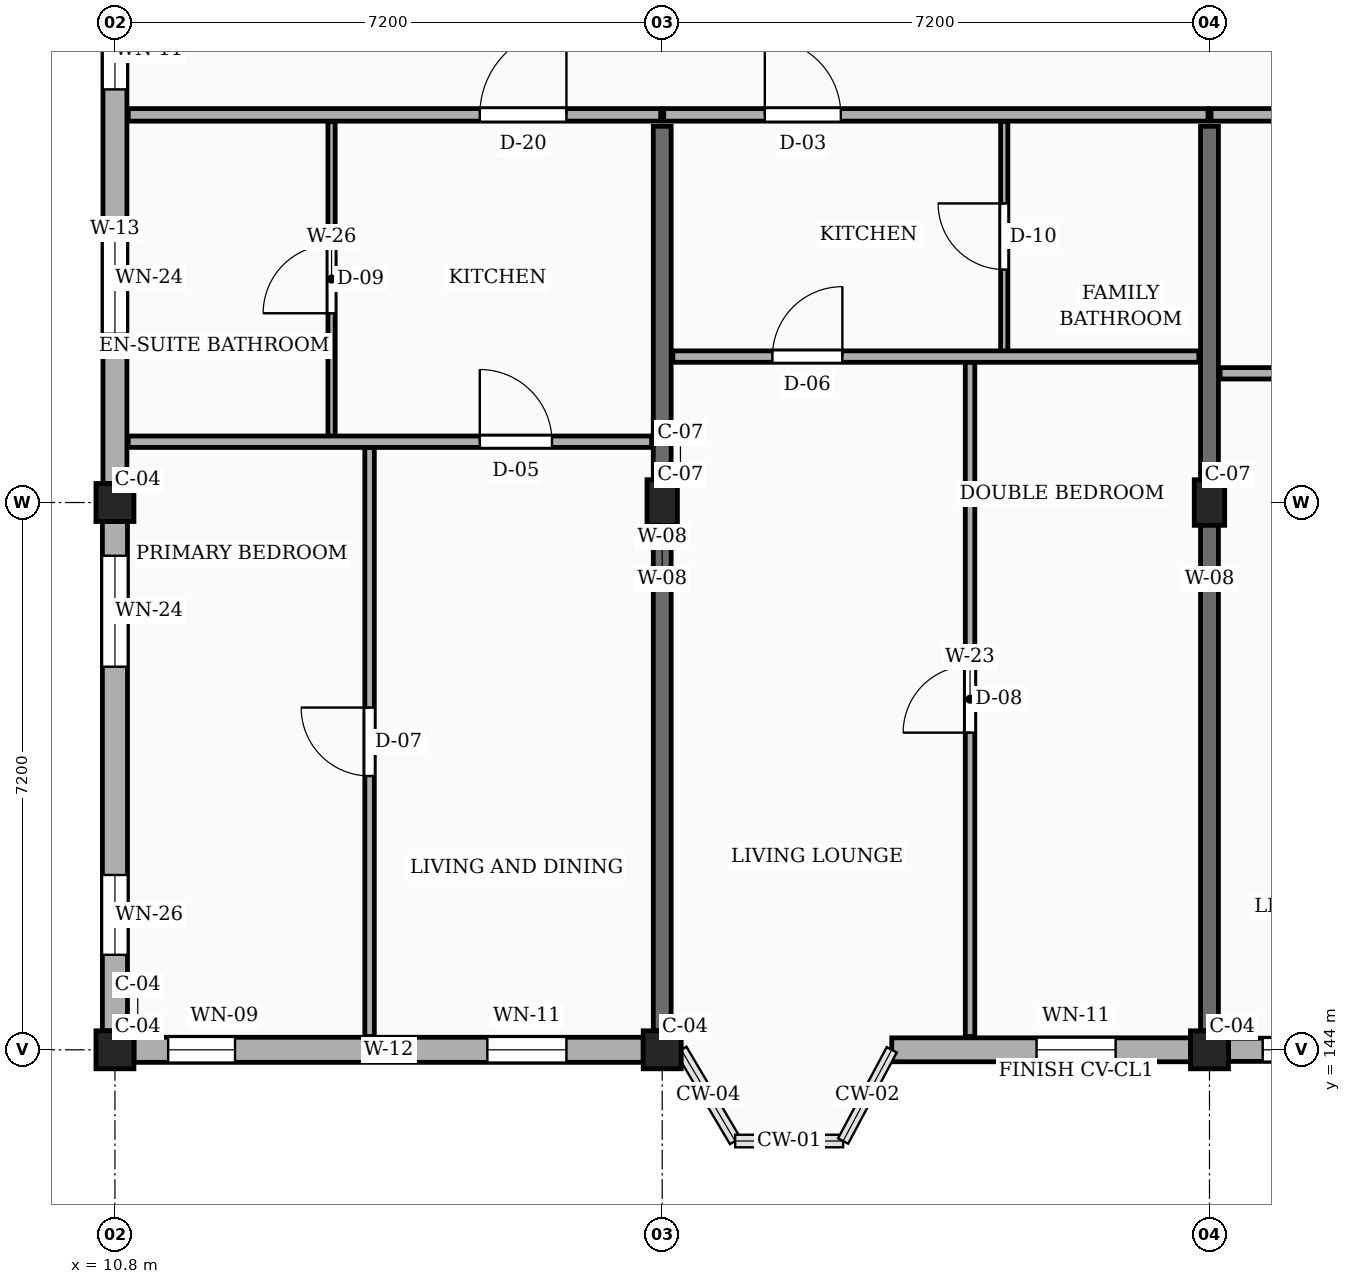
"""IFC4 building model, lengths in metres.
Left out: names, types, materials, properties, quantities, classifications, styles, units other than length and angle.
Written with IfcOpenShell. Run it as: python <this file> out.ifc"""

import sys

from ifc_helpers import new_model, si_unit, direction, frame, frame_2d, origin, origin_2d, place, context, subcontext, project, spatial, rectangle, extrude, element, fill, save


model = new_model("IFC4")
c1 = context("Model", 3, precision=1e-05, world=origin(), true_north=direction((0.0, 1.0)))
c2 = subcontext(c1, "Body", "Model", "MODEL_VIEW")
j1 = project(units=[si_unit("LENGTHUNIT", "METRE"), si_unit("PLANEANGLEUNIT", "RADIAN")], contexts=[c1])
p1 = place(None, origin())
s1 = spatial("IfcSite", under=j1, at=p1, CompositionType="ELEMENT")
p2 = place(p1, origin())
s2 = spatial("IfcBuilding", under=s1, at=p2, CompositionType="ELEMENT")
p3 = place(p2, frame((0.0, 0.0, 23.4)))
s3 = spatial("IfcBuildingStorey", under=s2, at=p3, CompositionType="ELEMENT", Elevation=23.4)
for number, where, z_axis, x_axis in (
    (1, (10.8, 144.0, 0.0), (0.0, 0.0, 1.0), (1.0, 0.0, 0.0)),
    (2, (10.8, 151.2, 0.0), (0.0, 0.0, 1.0), (1.0, 0.0, 0.0)),
    (3, (18.0, 144.0, 0.0), (0.0, 0.0, 1.0), (1.0, 0.0, 0.0)),
):
    element("IfcColumn", number, at=place(p3, frame(where, z_axis=z_axis, x_axis=x_axis)), inside=s3, PredefinedType="COLUMN", context=c2, shape_type="SweptSolid", body=[
        extrude(rectangle(XDim=0.5, YDim=0.5, at=origin_2d()), origin(), (0.0, 0.0, 1.0), 3.15),
    ])
p4 = place(p3, frame((18.0, 151.2, 0.0), z_axis=(0.0, 0.0, 1.0), x_axis=(1.0, 0.0, 0.0)))
e4 = element("IfcColumn", 4, at=p4, inside=s3, PredefinedType="COLUMN", context=c2, shape_type="SweptSolid", body=[
    extrude(rectangle(XDim=0.4, YDim=0.6, at=origin_2d()), origin(), (0.0, 0.0, 1.0), 3.15),
])
p5 = place(p3, frame((25.2, 144.0, 0.0), z_axis=(0.0, 0.0, 1.0), x_axis=(1.0, 0.0, 0.0)))
e5 = element("IfcColumn", 5, at=p5, inside=s3, PredefinedType="COLUMN", context=c2, shape_type="SweptSolid", body=[
    extrude(rectangle(XDim=0.5, YDim=0.5, at=origin_2d()), origin(), (0.0, 0.0, 1.0), 3.15),
])
p6 = place(p3, frame((25.2, 151.2, 0.0), z_axis=(0.0, 0.0, 1.0), x_axis=(1.0, 0.0, 0.0)))
e6 = element("IfcColumn", 6, at=p6, inside=s3, PredefinedType="COLUMN", context=c2, shape_type="SweptSolid", body=[
    extrude(rectangle(XDim=0.4, YDim=0.6, at=origin_2d()), origin(), (0.0, 0.0, 1.0), 3.15),
])
for number, where, z_axis, x_axis in (
    (7, (18.0, 144.25, 0.0), (0.0, 0.0, 1.0), (0.0, 1.0, 0.0)),
    (8, (25.2, 144.25, 0.0), (0.0, 0.0, 1.0), (0.0, 1.0, 0.0)),
):
    element("IfcWall", number, at=place(p3, frame(where, z_axis=z_axis, x_axis=x_axis)), inside=s3, PredefinedType="SOLIDWALL", context=c2, shape_type="SweptSolid", body=[
        extrude(rectangle(XDim=11.9, YDim=0.235, at=frame_2d((5.95, 0.0))), origin(), (0.0, 0.0, 1.0), 2.185),
    ])
p7 = place(p3, frame((11.05, 144.0, 0.0), z_axis=(0.0, 0.0, 1.0), x_axis=(1.0, 0.0, 0.0)))
e9 = element("IfcWall", 9, at=p7, inside=s3, PredefinedType="SOLIDWALL", context=c2, shape_type="SweptSolid", body=[
    extrude(rectangle(XDim=6.7, YDim=0.33, at=frame_2d((3.35, 0.0))), origin(), (0.0, 0.0, 1.0), 2.455),
])
p8 = place(p7, frame((0.45, 0.0, 0.78)))
e10 = element("IfcOpeningElement", 10, at=p8, cuts=e9, PredefinedType="OPENING", context=c2, shape_type="SweptSolid", body=[
    extrude(rectangle(XDim=0.88, YDim=1.26, at=frame_2d((0.44, 0.63))), frame((0.0, 0.175, 0.0), z_axis=(0.0, -1.0, 0.0), x_axis=(1.0, 0.0, 0.0)), (0.0, 0.0, 1.0), 0.35),
])
p9 = place(p7, frame((4.65, 0.0, 0.78)))
e11 = element("IfcOpeningElement", 11, at=p9, cuts=e9, PredefinedType="OPENING", context=c2, shape_type="SweptSolid", body=[
    extrude(rectangle(XDim=1.04, YDim=1.26, at=frame_2d((0.52, 0.63))), frame((0.0, 0.175, 0.0), z_axis=(0.0, -1.0, 0.0), x_axis=(1.0, 0.0, 0.0)), (0.0, 0.0, 1.0), 0.35),
])
p10 = place(p3, frame((21.02, 144.0, 0.0), z_axis=(0.0, 0.0, 1.0), x_axis=(1.0, 0.0, 0.0)))
e12 = element("IfcWall", 12, at=p10, inside=s3, PredefinedType="SOLIDWALL", context=c2, shape_type="SweptSolid", body=[
    extrude(rectangle(XDim=3.93, YDim=0.315, at=frame_2d((1.965, 0.0))), origin(), (0.0, 0.0, 1.0), 2.455),
])
p11 = place(p10, frame((1.905, 0.0, 0.78)))
e13 = element("IfcOpeningElement", 13, at=p11, cuts=e12, PredefinedType="OPENING", context=c2, shape_type="SweptSolid", body=[
    extrude(rectangle(XDim=1.04, YDim=1.26, at=frame_2d((0.52, 0.63))), frame((0.0, 0.167, 0.0), z_axis=(0.0, -1.0, 0.0), x_axis=(1.0, 0.0, 0.0)), (0.0, 0.0, 1.0), 0.335),
])
p12 = place(p3, frame((25.45, 144.0, 0.0), z_axis=(0.0, 0.0, 1.0), x_axis=(1.0, 0.0, 0.0)))
e14 = element("IfcWall", 14, at=p12, inside=s3, PredefinedType="SOLIDWALL", context=c2, shape_type="SweptSolid", body=[
    extrude(rectangle(XDim=6.7, YDim=0.305, at=frame_2d((3.35, 0.0))), origin(), (0.0, 0.0, 1.0), 2.455),
])
p13 = place(p12, frame((0.45, 0.0, 0.78)))
e15 = element("IfcOpeningElement", 15, at=p13, cuts=e14, PredefinedType="OPENING", context=c2, shape_type="SweptSolid", body=[
    extrude(rectangle(XDim=1.12, YDim=1.26, at=frame_2d((0.56, 0.63))), frame((0.0, 0.163, 0.0), z_axis=(0.0, -1.0, 0.0), x_axis=(1.0, 0.0, 0.0)), (0.0, 0.0, 1.0), 0.325),
])
p14 = place(p12, frame((4.65, 0.0, 0.78)))
e16 = element("IfcOpeningElement", 16, at=p14, cuts=e14, PredefinedType="OPENING", context=c2, shape_type="SweptSolid", body=[
    extrude(rectangle(XDim=1.28, YDim=1.26, at=frame_2d((0.64, 0.63))), frame((0.0, 0.163, 0.0), z_axis=(0.0, -1.0, 0.0), x_axis=(1.0, 0.0, 0.0)), (0.0, 0.0, 1.0), 0.325),
])
p15 = place(p3, frame((10.8, 158.15, 0.0), z_axis=(0.0, 0.0, 1.0), x_axis=(0.0, -1.0, 0.0)))
e17 = element("IfcWall", 17, at=p15, inside=s3, PredefinedType="SOLIDWALL", context=c2, shape_type="SweptSolid", body=[
    extrude(rectangle(XDim=6.7, YDim=0.315, at=frame_2d((3.35, 0.0))), origin(), (0.0, 0.0, 1.0), 2.455),
])
p16 = place(p15, frame((0.475, 0.0, 0.78)))
e18 = element("IfcOpeningElement", 18, at=p16, cuts=e17, PredefinedType="OPENING", context=c2, shape_type="SweptSolid", body=[
    extrude(rectangle(XDim=1.04, YDim=1.26, at=frame_2d((0.52, 0.63))), frame((0.0, 0.167, 0.0), z_axis=(0.0, -1.0, 0.0), x_axis=(1.0, 0.0, 0.0)), (0.0, 0.0, 1.0), 0.335),
])
p17 = place(p15, frame((3.27, 0.0, 0.78)))
e19 = element("IfcOpeningElement", 19, at=p17, cuts=e17, PredefinedType="OPENING", context=c2, shape_type="SweptSolid", body=[
    extrude(rectangle(XDim=1.46, YDim=1.36, at=frame_2d((0.73, 0.68))), frame((0.0, 0.167, 0.0), z_axis=(0.0, -1.0, 0.0), x_axis=(1.0, 0.0, 0.0)), (0.0, 0.0, 1.0), 0.335),
])
p18 = place(p3, frame((10.8, 150.95, 0.0), z_axis=(0.0, 0.0, 1.0), x_axis=(0.0, -1.0, 0.0)))
e20 = element("IfcWall", 20, at=p18, inside=s3, PredefinedType="SOLIDWALL", context=c2, shape_type="SweptSolid", body=[
    extrude(rectangle(XDim=6.7, YDim=0.33, at=frame_2d((3.35, 0.0))), origin(), (0.0, 0.0, 1.0), 2.455),
])
p19 = place(p18, frame((0.45, 0.0, 0.78)))
e21 = element("IfcOpeningElement", 21, at=p19, cuts=e20, PredefinedType="OPENING", context=c2, shape_type="SweptSolid", body=[
    extrude(rectangle(XDim=1.46, YDim=1.36, at=frame_2d((0.73, 0.68))), frame((0.0, 0.175, 0.0), z_axis=(0.0, -1.0, 0.0), x_axis=(1.0, 0.0, 0.0)), (0.0, 0.0, 1.0), 0.35),
])
p20 = place(p18, frame((4.65, 0.0, 0.78)))
e22 = element("IfcOpeningElement", 22, at=p20, cuts=e20, PredefinedType="OPENING", context=c2, shape_type="SweptSolid", body=[
    extrude(rectangle(XDim=1.05, YDim=1.44, at=frame_2d((0.525, 0.72))), frame((0.0, 0.175, 0.0), z_axis=(0.0, -1.0, 0.0), x_axis=(1.0, 0.0, 0.0)), (0.0, 0.0, 1.0), 0.35),
])
p21 = place(p3, frame((10.975, 156.3, 0.0), z_axis=(0.0, 0.0, 1.0), x_axis=(1.0, 0.0, 0.0)))
e23 = element("IfcWall", 23, at=p21, inside=s3, PredefinedType="PARTITIONING", context=c2, shape_type="SweptSolid", body=[
    extrude(rectangle(XDim=7.005, YDim=0.165, at=frame_2d((3.502, 0.0))), origin(), (0.0, 0.0, 1.0), 2.32),
])
p22 = place(p21, frame((4.625, 0.0, 0.0)))
e24 = element("IfcOpeningElement", 24, at=p22, cuts=e23, PredefinedType="OPENING", context=c2, shape_type="SweptSolid", body=[
    extrude(rectangle(XDim=1.14, YDim=2.18, at=frame_2d((0.57, 1.09))), frame((0.0, 0.093, 0.0), z_axis=(0.0, -1.0, 0.0), x_axis=(1.0, 0.0, 0.0)), (0.0, 0.0, 1.0), 0.185),
])
p23 = place(p3, frame((18.02, 156.3, 0.0), z_axis=(0.0, 0.0, 1.0), x_axis=(1.0, 0.0, 0.0)))
e25 = element("IfcWall", 25, at=p23, inside=s3, PredefinedType="PARTITIONING", context=c2, shape_type="SweptSolid", body=[
    extrude(rectangle(XDim=7.16, YDim=0.165, at=frame_2d((3.58, 0.0))), origin(), (0.0, 0.0, 1.0), 2.32),
])
p24 = place(p23, frame((1.33, 0.0, 0.0)))
e26 = element("IfcOpeningElement", 26, at=p24, cuts=e25, PredefinedType="OPENING", context=c2, shape_type="SweptSolid", body=[
    extrude(rectangle(XDim=1.0, YDim=2.15, at=frame_2d((0.5, 1.075))), frame((0.0, 0.093, 0.0), z_axis=(0.0, -1.0, 0.0), x_axis=(1.0, 0.0, 0.0)), (0.0, 0.0, 1.0), 0.185),
])
p25 = place(p3, frame((25.22, 156.3, 0.0), z_axis=(0.0, 0.0, 1.0), x_axis=(1.0, 0.0, 0.0)))
e27 = element("IfcWall", 27, at=p25, inside=s3, PredefinedType="PARTITIONING", context=c2, shape_type="SweptSolid", body=[
    extrude(rectangle(XDim=7.16, YDim=0.165, at=frame_2d((3.58, 0.0))), origin(), (0.0, 0.0, 1.0), 2.32),
])
p26 = place(p25, frame((1.33, 0.0, 0.0)))
e28 = element("IfcOpeningElement", 28, at=p26, cuts=e27, PredefinedType="OPENING", context=c2, shape_type="SweptSolid", body=[
    extrude(rectangle(XDim=0.94, YDim=2.12, at=frame_2d((0.47, 1.06))), frame((0.0, 0.093, 0.0), z_axis=(0.0, -1.0, 0.0), x_axis=(1.0, 0.0, 0.0)), (0.0, 0.0, 1.0), 0.185),
])
p27 = place(p3, frame((14.15, 144.175, 0.0), z_axis=(0.0, 0.0, 1.0), x_axis=(0.0, 1.0, 0.0)))
e29 = element("IfcWall", 29, at=p27, inside=s3, PredefinedType="PARTITIONING", context=c2, shape_type="SweptSolid", body=[
    extrude(rectangle(XDim=7.755, YDim=0.125, at=frame_2d((3.877, 0.0))), origin(), (0.0, 0.0, 1.0), 2.32),
])
p28 = place(p27, frame((3.427, 0.0, 0.0)))
e30 = element("IfcOpeningElement", 30, at=p28, cuts=e29, PredefinedType="OPENING", context=c2, shape_type="SweptSolid", body=[
    extrude(rectangle(XDim=0.9, YDim=2.1, at=frame_2d((0.45, 1.05))), frame((0.0, 0.073, 0.0), z_axis=(0.0, -1.0, 0.0), x_axis=(1.0, 0.0, 0.0)), (0.0, 0.0, 1.0), 0.145),
])
p29 = place(p3, frame((13.65, 152.07, 0.0), z_axis=(0.0, 0.0, 1.0), x_axis=(0.0, 1.0, 0.0)))
e31 = element("IfcWall", 31, at=p29, inside=s3, PredefinedType="PARTITIONING", context=c2, shape_type="SweptSolid", body=[
    extrude(rectangle(XDim=4.14, YDim=0.095, at=frame_2d((2.07, 0.0))), origin(), (0.0, 0.0, 1.0), 2.32),
])
p30 = place(p29, frame((1.62, 0.0, 0.0)))
e32 = element("IfcOpeningElement", 32, at=p30, cuts=e31, PredefinedType="OPENING", context=c2, shape_type="SweptSolid", body=[
    extrude(rectangle(XDim=0.9, YDim=2.05, at=frame_2d((0.45, 1.025))), frame((0.0, 0.058, 0.0), z_axis=(0.0, -1.0, 0.0), x_axis=(1.0, 0.0, 0.0)), (0.0, 0.0, 1.0), 0.115),
])
p31 = place(p3, frame((10.975, 152.0, 0.0), z_axis=(0.0, 0.0, 1.0), x_axis=(1.0, 0.0, 0.0)))
e33 = element("IfcWall", 33, at=p31, inside=s3, PredefinedType="PARTITIONING", context=c2, shape_type="SweptSolid", body=[
    extrude(rectangle(XDim=6.885, YDim=0.15, at=frame_2d((3.442, 0.0))), origin(), (0.0, 0.0, 1.0), 2.32),
])
p32 = place(p31, frame((4.625, 0.0, 0.0)))
e34 = element("IfcOpeningElement", 34, at=p32, cuts=e33, PredefinedType="OPENING", context=c2, shape_type="SweptSolid", body=[
    extrude(rectangle(XDim=0.95, YDim=2.1, at=frame_2d((0.475, 1.05))), frame((0.0, 0.085, 0.0), z_axis=(0.0, -1.0, 0.0), x_axis=(1.0, 0.0, 0.0)), (0.0, 0.0, 1.0), 0.17),
])
p33 = place(p3, frame((22.05, 144.175, 0.0), z_axis=(0.0, 0.0, 1.0), x_axis=(0.0, 1.0, 0.0)))
e35 = element("IfcWall", 35, at=p33, inside=s3, PredefinedType="PARTITIONING", context=c2, shape_type="SweptSolid", body=[
    extrude(rectangle(XDim=8.875, YDim=0.125, at=frame_2d((4.438, 0.0))), origin(), (0.0, 0.0, 1.0), 2.32),
])
p34 = place(p33, frame((3.998, 0.0, 0.0)))
e36 = element("IfcOpeningElement", 36, at=p34, cuts=e35, PredefinedType="OPENING", context=c2, shape_type="SweptSolid", body=[
    extrude(rectangle(XDim=0.88, YDim=2.08, at=frame_2d((0.44, 1.04))), frame((0.0, 0.073, 0.0), z_axis=(0.0, -1.0, 0.0), x_axis=(1.0, 0.0, 0.0)), (0.0, 0.0, 1.0), 0.145),
])
p35 = place(p3, frame((22.5, 153.19, 0.0), z_axis=(0.0, 0.0, 1.0), x_axis=(0.0, 1.0, 0.0)))
e37 = element("IfcWall", 37, at=p35, inside=s3, PredefinedType="PARTITIONING", context=c2, shape_type="SweptSolid", body=[
    extrude(rectangle(XDim=3.02, YDim=0.095, at=frame_2d((1.51, 0.0))), origin(), (0.0, 0.0, 1.0), 2.32),
])
p36 = place(p35, frame((1.075, 0.0, 0.0)))
e38 = element("IfcOpeningElement", 38, at=p36, cuts=e37, PredefinedType="OPENING", context=c2, shape_type="SweptSolid", body=[
    extrude(rectangle(XDim=0.87, YDim=2.05, at=frame_2d((0.435, 1.025))), frame((0.0, 0.058, 0.0), z_axis=(0.0, -1.0, 0.0), x_axis=(1.0, 0.0, 0.0)), (0.0, 0.0, 1.0), 0.115),
])
p37 = place(p3, frame((18.14, 153.12, 0.0), z_axis=(0.0, 0.0, 1.0), x_axis=(1.0, 0.0, 0.0)))
e39 = element("IfcWall", 39, at=p37, inside=s3, PredefinedType="PARTITIONING", context=c2, shape_type="SweptSolid", body=[
    extrude(rectangle(XDim=6.92, YDim=0.15, at=frame_2d((3.46, 0.0))), origin(), (0.0, 0.0, 1.0), 2.32),
])
p38 = place(p37, frame((1.31, 0.0, 0.0)))
e40 = element("IfcOpeningElement", 40, at=p38, cuts=e39, PredefinedType="OPENING", context=c2, shape_type="SweptSolid", body=[
    extrude(rectangle(XDim=0.92, YDim=2.1, at=frame_2d((0.46, 1.05))), frame((0.0, 0.085, 0.0), z_axis=(0.0, -1.0, 0.0), x_axis=(1.0, 0.0, 0.0)), (0.0, 0.0, 1.0), 0.17),
])
p39 = place(p3, frame((25.34, 152.9, 0.0), z_axis=(0.0, 0.0, 1.0), x_axis=(1.0, 0.0, 0.0)))
e41 = element("IfcWall", 41, at=p39, inside=s3, PredefinedType="PARTITIONING", context=c2, shape_type="SweptSolid", body=[
    extrude(rectangle(XDim=6.92, YDim=0.15, at=frame_2d((3.46, 0.0))), origin(), (0.0, 0.0, 1.0), 2.32),
])
p40 = place(p39, frame((1.31, 0.0, 0.0)))
e42 = element("IfcOpeningElement", 42, at=p40, cuts=e41, PredefinedType="OPENING", context=c2, shape_type="SweptSolid", body=[
    extrude(rectangle(XDim=0.95, YDim=2.1, at=frame_2d((0.475, 1.05))), frame((0.0, 0.085, 0.0), z_axis=(0.0, -1.0, 0.0), x_axis=(1.0, 0.0, 0.0)), (0.0, 0.0, 1.0), 0.17),
])
p41 = place(p8, origin())
e43 = element("IfcWindow", 43, at=p41, inside=s3, PartitioningType="SINGLE_PANEL", PredefinedType="WINDOW", context=c2, shape_type="SweptSolid", body=[
    extrude(rectangle(XDim=0.88, YDim=1.26, at=frame_2d((0.44, 0.63))), frame((0.0, 0.03, 0.0), z_axis=(0.0, -1.0, 0.0), x_axis=(1.0, 0.0, 0.0)), (0.0, 0.0, 1.0), 0.06),
])
fill(e10, e43)
p42 = place(p9, origin())
e44 = element("IfcWindow", 44, at=p42, inside=s3, PartitioningType="SINGLE_PANEL", PredefinedType="WINDOW", context=c2, shape_type="SweptSolid", body=[
    extrude(rectangle(XDim=1.04, YDim=1.26, at=frame_2d((0.52, 0.63))), frame((0.0, 0.03, 0.0), z_axis=(0.0, -1.0, 0.0), x_axis=(1.0, 0.0, 0.0)), (0.0, 0.0, 1.0), 0.06),
])
fill(e11, e44)
p43 = place(p11, origin())
e45 = element("IfcWindow", 45, at=p43, inside=s3, PartitioningType="SINGLE_PANEL", PredefinedType="WINDOW", context=c2, shape_type="SweptSolid", body=[
    extrude(rectangle(XDim=1.04, YDim=1.26, at=frame_2d((0.52, 0.63))), frame((0.0, 0.03, 0.0), z_axis=(0.0, -1.0, 0.0), x_axis=(1.0, 0.0, 0.0)), (0.0, 0.0, 1.0), 0.06),
])
fill(e13, e45)
p44 = place(p13, origin())
e46 = element("IfcWindow", 46, at=p44, inside=s3, PartitioningType="SINGLE_PANEL", PredefinedType="WINDOW", context=c2, shape_type="SweptSolid", body=[
    extrude(rectangle(XDim=1.12, YDim=1.26, at=frame_2d((0.56, 0.63))), frame((0.0, 0.03, 0.0), z_axis=(0.0, -1.0, 0.0), x_axis=(1.0, 0.0, 0.0)), (0.0, 0.0, 1.0), 0.06),
])
fill(e15, e46)
p45 = place(p16, origin())
e47 = element("IfcWindow", 47, at=p45, inside=s3, PartitioningType="SINGLE_PANEL", PredefinedType="WINDOW", context=c2, shape_type="SweptSolid", body=[
    extrude(rectangle(XDim=1.04, YDim=1.26, at=frame_2d((0.52, 0.63))), frame((0.0, 0.03, 0.0), z_axis=(0.0, -1.0, 0.0), x_axis=(1.0, 0.0, 0.0)), (0.0, 0.0, 1.0), 0.06),
])
fill(e18, e47)
p46 = place(p17, origin())
e48 = element("IfcWindow", 48, at=p46, inside=s3, PartitioningType="SINGLE_PANEL", PredefinedType="WINDOW", context=c2, shape_type="SweptSolid", body=[
    extrude(rectangle(XDim=1.46, YDim=1.36, at=frame_2d((0.73, 0.68))), frame((0.0, 0.03, 0.0), z_axis=(0.0, -1.0, 0.0), x_axis=(1.0, 0.0, 0.0)), (0.0, 0.0, 1.0), 0.06),
])
fill(e19, e48)
p47 = place(p19, origin())
e49 = element("IfcWindow", 49, at=p47, inside=s3, PartitioningType="SINGLE_PANEL", PredefinedType="WINDOW", context=c2, shape_type="SweptSolid", body=[
    extrude(rectangle(XDim=1.46, YDim=1.36, at=frame_2d((0.73, 0.68))), frame((0.0, 0.03, 0.0), z_axis=(0.0, -1.0, 0.0), x_axis=(1.0, 0.0, 0.0)), (0.0, 0.0, 1.0), 0.06),
])
fill(e21, e49)
p48 = place(p20, origin())
e50 = element("IfcWindow", 50, at=p48, inside=s3, PartitioningType="SINGLE_PANEL", PredefinedType="WINDOW", context=c2, shape_type="SweptSolid", body=[
    extrude(rectangle(XDim=1.05, YDim=1.44, at=frame_2d((0.525, 0.72))), frame((0.0, 0.03, 0.0), z_axis=(0.0, -1.0, 0.0), x_axis=(1.0, 0.0, 0.0)), (0.0, 0.0, 1.0), 0.06),
])
fill(e22, e50)
p49 = place(p22, origin())
e51 = element("IfcDoor", 51, at=p49, inside=s3, OperationType="SINGLE_SWING_RIGHT", PredefinedType="DOOR", context=c2, shape_type="SweptSolid", body=[
    extrude(rectangle(XDim=1.14, YDim=2.18, at=frame_2d((0.57, 1.09))), frame((0.0, 0.025, 0.0), z_axis=(0.0, -1.0, 0.0), x_axis=(1.0, 0.0, 0.0)), (0.0, 0.0, 1.0), 0.05),
])
fill(e24, e51)
p50 = place(p24, origin())
e52 = element("IfcDoor", 52, at=p50, inside=s3, OperationType="SINGLE_SWING_LEFT", PredefinedType="DOOR", context=c2, shape_type="SweptSolid", body=[
    extrude(rectangle(XDim=1.0, YDim=2.15, at=frame_2d((0.5, 1.075))), frame((0.0, 0.025, 0.0), z_axis=(0.0, -1.0, 0.0), x_axis=(1.0, 0.0, 0.0)), (0.0, 0.0, 1.0), 0.05),
])
fill(e26, e52)
p51 = place(p28, origin())
e53 = element("IfcDoor", 53, at=p51, inside=s3, OperationType="SINGLE_SWING_RIGHT", PredefinedType="DOOR", context=c2, shape_type="SweptSolid", body=[
    extrude(rectangle(XDim=0.9, YDim=2.1, at=frame_2d((0.45, 1.05))), frame((0.0, 0.025, 0.0), z_axis=(0.0, -1.0, 0.0), x_axis=(1.0, 0.0, 0.0)), (0.0, 0.0, 1.0), 0.05),
])
fill(e30, e53)
p52 = place(p30, origin())
e54 = element("IfcDoor", 54, at=p52, inside=s3, OperationType="SINGLE_SWING_LEFT", PredefinedType="DOOR", context=c2, shape_type="SweptSolid", body=[
    extrude(rectangle(XDim=0.9, YDim=2.05, at=frame_2d((0.45, 1.025))), frame((0.0, 0.025, 0.0), z_axis=(0.0, -1.0, 0.0), x_axis=(1.0, 0.0, 0.0)), (0.0, 0.0, 1.0), 0.05),
])
fill(e32, e54)
p53 = place(p32, origin())
e55 = element("IfcDoor", 55, at=p53, inside=s3, OperationType="SINGLE_SWING_LEFT", PredefinedType="DOOR", context=c2, shape_type="SweptSolid", body=[
    extrude(rectangle(XDim=0.95, YDim=2.1, at=frame_2d((0.475, 1.05))), frame((0.0, 0.025, 0.0), z_axis=(0.0, -1.0, 0.0), x_axis=(1.0, 0.0, 0.0)), (0.0, 0.0, 1.0), 0.05),
])
fill(e34, e55)
p54 = place(p34, origin())
e56 = element("IfcDoor", 56, at=p54, inside=s3, OperationType="SINGLE_SWING_LEFT", PredefinedType="DOOR", context=c2, shape_type="SweptSolid", body=[
    extrude(rectangle(XDim=0.88, YDim=2.08, at=frame_2d((0.44, 1.04))), frame((0.0, 0.025, 0.0), z_axis=(0.0, -1.0, 0.0), x_axis=(1.0, 0.0, 0.0)), (0.0, 0.0, 1.0), 0.05),
])
fill(e36, e56)
p55 = place(p36, origin())
e57 = element("IfcDoor", 57, at=p55, inside=s3, OperationType="SINGLE_SWING_RIGHT", PredefinedType="DOOR", context=c2, shape_type="SweptSolid", body=[
    extrude(rectangle(XDim=0.87, YDim=2.05, at=frame_2d((0.435, 1.025))), frame((0.0, 0.025, 0.0), z_axis=(0.0, -1.0, 0.0), x_axis=(1.0, 0.0, 0.0)), (0.0, 0.0, 1.0), 0.05),
])
fill(e38, e57)
p56 = place(p38, origin())
e58 = element("IfcDoor", 58, at=p56, inside=s3, OperationType="SINGLE_SWING_RIGHT", PredefinedType="DOOR", context=c2, shape_type="SweptSolid", body=[
    extrude(rectangle(XDim=0.92, YDim=2.1, at=frame_2d((0.46, 1.05))), frame((0.0, 0.025, 0.0), z_axis=(0.0, -1.0, 0.0), x_axis=(1.0, 0.0, 0.0)), (0.0, 0.0, 1.0), 0.05),
])
fill(e40, e58)
save(model, sys.argv[1])
